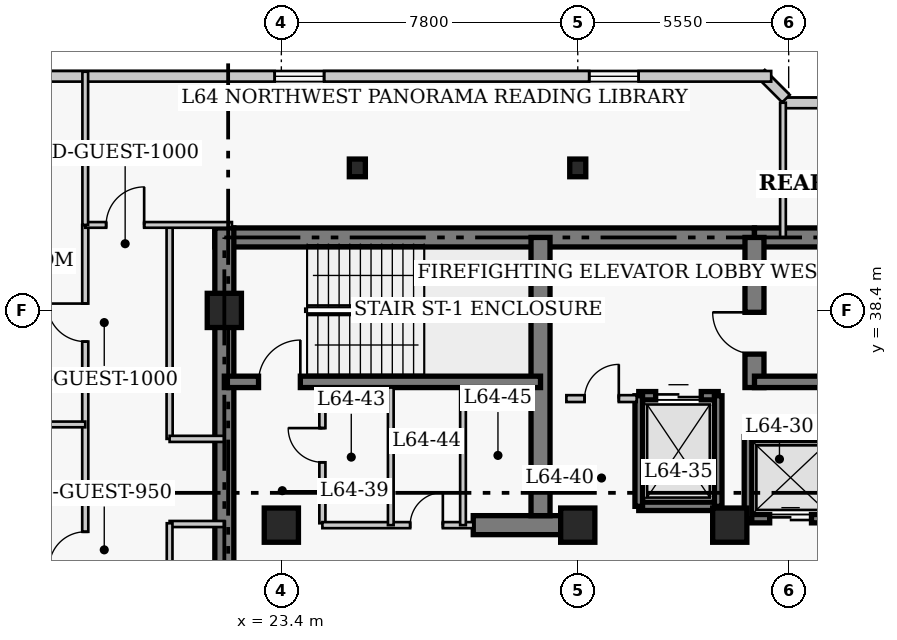
"""IFC4 building model, lengths in metres.
Left out: names, types, materials, properties, quantities, classifications, styles, units other than length and angle.
Written with IfcOpenShell. Run it as: python <this file> out.ifc"""

import sys

from ifc_helpers import new_model, si_unit, direction, frame, frame_2d, origin, origin_2d, place, context, subcontext, project, spatial, rectangle, i_section, extrude, element, fill, save


model = new_model("IFC4")
c1 = context("Model", 3, precision=1e-05, world=origin(), true_north=direction((0.0, 1.0)))
c2 = subcontext(c1, "Body", "Model", "MODEL_VIEW")
j1 = project(units=[si_unit("LENGTHUNIT", "METRE"), si_unit("PLANEANGLEUNIT", "RADIAN")], contexts=[c1])
p1 = place(None, origin())
s1 = spatial("IfcSite", under=j1, at=p1, CompositionType="ELEMENT")
p2 = place(p1, origin())
s2 = spatial("IfcBuilding", under=s1, at=p2, CompositionType="ELEMENT")
p3 = place(p2, frame((0.0, 0.0, 257.4)))
s3 = spatial("IfcBuildingStorey", under=s2, at=p3, CompositionType="ELEMENT", Elevation=257.4)
p4 = place(p3, frame((21.65, 40.32, 0.0), z_axis=(0.0, 0.0, 1.0), x_axis=(1.0, 0.0, 0.0)))
e1 = element("IfcWall", 1, at=p4, inside=s3, PredefinedType="SHEAR", context=c2, shape_type="SweptSolid", body=[
    extrude(rectangle(XDim=14.2, YDim=0.5, at=frame_2d((7.1, 0.0))), origin(), (0.0, 0.0, 1.0), 4.0),
])
p5 = place(p3, frame((35.85, 40.32, 0.0), z_axis=(0.0, 0.0, 1.0), x_axis=(1.0, 0.0, 0.0)))
e2 = element("IfcWall", 2, at=p5, inside=s3, PredefinedType="SHEAR", context=c2, shape_type="SweptSolid", body=[
    extrude(rectangle(XDim=12.6, YDim=0.5, at=frame_2d((6.3, 0.0))), origin(), (0.0, 0.0, 1.0), 4.0),
])
p6 = place(p3, frame((21.9, 27.05, 0.0), z_axis=(0.0, 0.0, 1.0), x_axis=(0.0, 1.0, 0.0)))
e3 = element("IfcWall", 3, at=p6, inside=s3, PredefinedType="SHEAR", context=c2, shape_type="SweptSolid", body=[
    extrude(rectangle(XDim=13.52, YDim=0.5, at=frame_2d((6.76, 0.0))), origin(), (0.0, 0.0, 1.0), 4.0),
])
p7 = place(p3, frame((28.45, 32.75, 0.0), z_axis=(0.0, 0.0, 1.0), x_axis=(1.0, 0.0, 0.0)))
e4 = element("IfcWall", 4, at=p7, inside=s3, PredefinedType="SHEAR", context=c2, shape_type="SweptSolid", body=[
    extrude(rectangle(XDim=2.4, YDim=0.5, at=frame_2d((1.2, 0.0))), origin(), (0.0, 0.0, 1.0), 4.0),
])
p8 = place(p3, frame((30.22, 33.0, 0.0), z_axis=(0.0, 0.0, 1.0), x_axis=(0.0, 1.0, 0.0)))
e5 = element("IfcWall", 5, at=p8, inside=s3, PredefinedType="SHEAR", context=c2, shape_type="SweptSolid", body=[
    extrude(rectangle(XDim=7.32, YDim=0.5, at=frame_2d((3.66, 0.0))), origin(), (0.0, 0.0, 1.0), 4.0),
])
p9 = place(p3, frame((35.85, 36.37, 0.0), z_axis=(0.0, 0.0, 1.0), x_axis=(0.0, 1.0, 0.0)))
e6 = element("IfcWall", 6, at=p9, inside=s3, PredefinedType="SHEAR", context=c2, shape_type="SweptSolid", body=[
    extrude(rectangle(XDim=3.95, YDim=0.5, at=frame_2d((1.975, 0.0))), origin(), (0.0, 0.0, 1.0), 4.0),
])
p10 = place(p9, frame((0.88, 0.0, 0.0)))
e7 = element("IfcOpeningElement", 7, at=p10, cuts=e6, PredefinedType="OPENING", context=c2, shape_type="SweptSolid", body=[
    extrude(rectangle(XDim=1.1, YDim=2.15, at=frame_2d((0.55, 1.075))), frame((0.0, 0.26, 0.0), z_axis=(0.0, -1.0, 0.0), x_axis=(1.0, 0.0, 0.0)), (0.0, 0.0, 1.0), 0.52),
])
p11 = place(p3, frame((21.9, 36.52, 0.0), z_axis=(0.0, 0.0, 1.0), x_axis=(1.0, 0.0, 0.0)))
e8 = element("IfcWall", 8, at=p11, inside=s3, PredefinedType="SHEAR", context=c2, shape_type="SweptSolid", body=[
    extrude(rectangle(XDim=8.32, YDim=0.3, at=frame_2d((4.16, 0.0))), origin(), (0.0, 0.0, 1.0), 4.0),
])
p12 = place(p11, frame((0.9, 0.0, 0.0)))
e9 = element("IfcOpeningElement", 9, at=p12, cuts=e8, PredefinedType="OPENING", context=c2, shape_type="SweptSolid", body=[
    extrude(rectangle(XDim=1.1, YDim=2.15, at=frame_2d((0.55, 1.075))), frame((0.0, 0.16, 0.0), z_axis=(0.0, -1.0, 0.0), x_axis=(1.0, 0.0, 0.0)), (0.0, 0.0, 1.0), 0.32),
])
p13 = place(p3, frame((35.85, 36.52, 0.0), z_axis=(0.0, 0.0, 1.0), x_axis=(1.0, 0.0, 0.0)))
e10 = element("IfcWall", 10, at=p13, inside=s3, PredefinedType="SHEAR", context=c2, shape_type="SweptSolid", body=[
    extrude(rectangle(XDim=8.33, YDim=0.3, at=frame_2d((4.165, 0.0))), origin(), (0.0, 0.0, 1.0), 4.0),
])
for number, where, z_axis, x_axis in (
    (11, (21.9, 38.4, 0.0), (0.0, 0.0, 1.0), (1.0, 0.0, 0.0)),
    (12, (23.4, 32.75, 0.0), (0.0, 0.0, 1.0), (1.0, 0.0, 0.0)),
    (13, (31.2, 32.75, 0.0), (0.0, 0.0, 1.0), (1.0, 0.0, 0.0)),
    (14, (35.2, 32.75, 0.0), (0.0, 0.0, 1.0), (1.0, 0.0, 0.0)),
):
    element("IfcColumn", number, at=place(p3, frame(where, z_axis=z_axis, x_axis=x_axis)), inside=s3, PredefinedType="COLUMN", context=c2, shape_type="SweptSolid", body=[
        extrude(rectangle(XDim=0.9, YDim=0.9, at=origin_2d()), origin(), (0.0, 0.0, 1.0), 4.0),
    ])
for number, where, z_axis, x_axis in (
    (15, (25.4, 42.15, 0.0), (0.0, 0.0, 1.0), (1.0, 0.0, 0.0)),
    (16, (31.2, 42.15, 0.0), (0.0, 0.0, 1.0), (1.0, 0.0, 0.0)),
):
    element("IfcColumn", number, at=place(p3, frame(where, z_axis=z_axis, x_axis=x_axis)), inside=s3, PredefinedType="COLUMN", context=c2, shape_type="SweptSolid", body=[
        extrude(i_section(OverallWidth=0.422, OverallDepth=0.465, WebThickness=0.045, FlangeThickness=0.073, FilletRadius=0.017, at=origin_2d()), origin(), (0.0, 0.0, 1.0), 4.0),
    ])
p14 = place(p3, frame((41.39, 43.86, 0.0), z_axis=(0.0, 0.0, 1.0), x_axis=(-1.0, 0.0, 0.0)))
e17 = element("IfcWall", 17, at=p14, inside=s3, PredefinedType="SOLIDWALL", context=c2, shape_type="SweptSolid", body=[
    extrude(rectangle(XDim=4.78, YDim=0.28, at=frame_2d((2.39, 0.0))), origin(), (0.0, 0.0, 1.0), 3.76),
])
p15 = place(p14, frame((1.74, 0.0, 0.85)))
e18 = element("IfcOpeningElement", 18, at=p15, cuts=e17, PredefinedType="OPENING", context=c2, shape_type="SweptSolid", body=[
    extrude(rectangle(XDim=1.3, YDim=1.7, at=frame_2d((0.65, 0.85))), frame((0.0, 0.15, 0.0), z_axis=(0.0, -1.0, 0.0), x_axis=(1.0, 0.0, 0.0)), (0.0, 0.0, 1.0), 0.3),
])
p16 = place(p3, frame((36.679, 43.973, 0.0), z_axis=(0.0, 0.0, 1.0), x_axis=(-0.706975312048, 0.707238225886, 0.0)))
e19 = element("IfcWall", 19, at=p16, inside=s3, PredefinedType="SOLIDWALL", context=c2, shape_type="SweptSolid", body=[
    extrude(rectangle(XDim=0.929, YDim=0.28, at=frame_2d((0.464, 0.0))), origin(), (0.0, 0.0, 1.0), 3.76),
])
p17 = place(p3, frame((36.29, 44.56, 0.0), z_axis=(0.0, 0.0, 1.0), x_axis=(-1.0, 0.0, 0.0)))
e20 = element("IfcWall", 20, at=p17, inside=s3, PredefinedType="SOLIDWALL", context=c2, shape_type="SweptSolid", body=[
    extrude(rectangle(XDim=24.83, YDim=0.28, at=frame_2d((12.415, 0.0))), origin(), (0.0, 0.0, 1.0), 3.76),
])
p18 = place(p17, frame((3.488, 0.0, 0.85)))
e21 = element("IfcOpeningElement", 21, at=p18, cuts=e20, PredefinedType="OPENING", context=c2, shape_type="SweptSolid", body=[
    extrude(rectangle(XDim=1.3, YDim=1.7, at=frame_2d((0.65, 0.85))), frame((0.0, 0.15, 0.0), z_axis=(0.0, -1.0, 0.0), x_axis=(1.0, 0.0, 0.0)), (0.0, 0.0, 1.0), 0.3),
])
p19 = place(p17, frame((11.765, 0.0, 0.85)))
e22 = element("IfcOpeningElement", 22, at=p19, cuts=e20, PredefinedType="OPENING", context=c2, shape_type="SweptSolid", body=[
    extrude(rectangle(XDim=1.3, YDim=1.7, at=frame_2d((0.65, 0.85))), frame((0.0, 0.15, 0.0), z_axis=(0.0, -1.0, 0.0), x_axis=(1.0, 0.0, 0.0)), (0.0, 0.0, 1.0), 0.3),
])
p20 = place(p17, frame((20.042, 0.0, 0.85)))
e23 = element("IfcOpeningElement", 23, at=p20, cuts=e20, PredefinedType="OPENING", context=c2, shape_type="SweptSolid", body=[
    extrude(rectangle(XDim=1.3, YDim=1.7, at=frame_2d((0.65, 0.85))), frame((0.0, 0.15, 0.0), z_axis=(0.0, -1.0, 0.0), x_axis=(1.0, 0.0, 0.0)), (0.0, 0.0, 1.0), 0.3),
])
p21 = place(p3, frame((35.68, 35.08, 0.0), z_axis=(0.0, 0.0, 1.0), x_axis=(1.0, 0.0, 0.0)))
e24 = element("IfcWall", 24, at=p21, inside=s3, PredefinedType="SHEAR", context=c2, shape_type="SweptSolid", body=[
    extrude(rectangle(XDim=2.32, YDim=0.22, at=frame_2d((1.16, 0.0))), origin(), (0.0, 0.0, 1.0), 4.0),
])
p22 = place(p3, frame((35.68, 32.92, 0.0), z_axis=(0.0, 0.0, 1.0), x_axis=(1.0, 0.0, 0.0)))
e25 = element("IfcWall", 25, at=p22, inside=s3, PredefinedType="SHEAR", context=c2, shape_type="SweptSolid", body=[
    extrude(rectangle(XDim=2.32, YDim=0.22, at=frame_2d((1.16, 0.0))), origin(), (0.0, 0.0, 1.0), 4.0),
])
p23 = place(p22, frame((0.57, 0.0, 0.0)))
e26 = element("IfcOpeningElement", 26, at=p23, cuts=e25, PredefinedType="OPENING", context=c2, shape_type="SweptSolid", body=[
    extrude(rectangle(XDim=1.1, YDim=2.15, at=frame_2d((0.55, 1.075))), frame((0.0, 0.12, 0.0), z_axis=(0.0, -1.0, 0.0), x_axis=(1.0, 0.0, 0.0)), (0.0, 0.0, 1.0), 0.24),
])
p24 = place(p3, frame((35.68, 32.92, 0.0), z_axis=(0.0, 0.0, 1.0), x_axis=(0.0, 1.0, 0.0)))
e27 = element("IfcWall", 27, at=p24, inside=s3, PredefinedType="SHEAR", context=c2, shape_type="SweptSolid", body=[
    extrude(rectangle(XDim=2.16, YDim=0.2, at=frame_2d((1.08, 0.0))), origin(), (0.0, 0.0, 1.0), 4.0),
])
p25 = place(p3, frame((32.805, 36.155, 0.0), z_axis=(0.0, 0.0, 1.0), x_axis=(1.0, 0.0, 0.0)))
e28 = element("IfcWall", 28, at=p25, inside=s3, PredefinedType="SHEAR", context=c2, shape_type="SweptSolid", body=[
    extrude(rectangle(XDim=2.09, YDim=0.22, at=frame_2d((1.045, 0.0))), origin(), (0.0, 0.0, 1.0), 4.0),
])
p26 = place(p25, frame((0.445, 0.0, 0.0)))
e29 = element("IfcOpeningElement", 29, at=p26, cuts=e28, PredefinedType="OPENING", context=c2, shape_type="SweptSolid", body=[
    extrude(rectangle(XDim=1.2, YDim=2.15, at=frame_2d((0.6, 1.075))), frame((0.0, 0.12, 0.0), z_axis=(0.0, -1.0, 0.0), x_axis=(1.0, 0.0, 0.0)), (0.0, 0.0, 1.0), 0.24),
])
p27 = place(p3, frame((32.805, 33.245, 0.0), z_axis=(0.0, 0.0, 1.0), x_axis=(1.0, 0.0, 0.0)))
e30 = element("IfcWall", 30, at=p27, inside=s3, PredefinedType="SHEAR", context=c2, shape_type="SweptSolid", body=[
    extrude(rectangle(XDim=2.09, YDim=0.22, at=frame_2d((1.045, 0.0))), origin(), (0.0, 0.0, 1.0), 4.0),
])
for number, where, z_axis, x_axis in (
    (31, (32.805, 33.245, 0.0), (0.0, 0.0, 1.0), (0.0, 1.0, 0.0)),
    (32, (34.895, 33.245, 0.0), (0.0, 0.0, 1.0), (0.0, 1.0, 0.0)),
):
    element("IfcWall", number, at=place(p3, frame(where, z_axis=z_axis, x_axis=x_axis)), inside=s3, PredefinedType="SHEAR", context=c2, shape_type="SweptSolid", body=[
        extrude(rectangle(XDim=2.91, YDim=0.2, at=frame_2d((1.455, 0.0))), origin(), (0.0, 0.0, 1.0), 4.0),
    ])
p28 = place(p3, frame((30.9, 36.08, 0.0), z_axis=(0.0, 0.0, 1.0), x_axis=(1.0, 0.0, 0.0)))
e33 = element("IfcWall", 33, at=p28, inside=s3, PredefinedType="PARTITIONING", context=c2, shape_type="SweptSolid", body=[
    extrude(rectangle(XDim=1.85, YDim=0.18, at=frame_2d((0.925, 0.0))), origin(), (0.0, 0.0, 1.0), 3.76),
])
p29 = place(p28, frame((0.48, 0.0, 0.0)))
e34 = element("IfcOpeningElement", 34, at=p29, cuts=e33, PredefinedType="OPENING", context=c2, shape_type="SweptSolid", body=[
    extrude(rectangle(XDim=0.9, YDim=2.15, at=frame_2d((0.45, 1.075))), frame((0.0, 0.1, 0.0), z_axis=(0.0, -1.0, 0.0), x_axis=(1.0, 0.0, 0.0)), (0.0, 0.0, 1.0), 0.2),
])
p30 = place(p3, frame((24.48, 32.8, 0.0), z_axis=(0.0, 0.0, 1.0), x_axis=(0.0, 1.0, 0.0)))
e35 = element("IfcWall", 35, at=p30, inside=s3, PredefinedType="PARTITIONING", context=c2, shape_type="SweptSolid", body=[
    extrude(rectangle(XDim=3.57, YDim=0.16, at=frame_2d((1.785, 0.0))), origin(), (0.0, 0.0, 1.0), 3.76),
])
p31 = place(p30, frame((1.604, 0.0, 0.0)))
e36 = element("IfcOpeningElement", 36, at=p31, cuts=e35, PredefinedType="OPENING", context=c2, shape_type="SweptSolid", body=[
    extrude(rectangle(XDim=0.9, YDim=2.1, at=frame_2d((0.45, 1.05))), frame((0.0, 0.09, 0.0), z_axis=(0.0, -1.0, 0.0), x_axis=(1.0, 0.0, 0.0)), (0.0, 0.0, 1.0), 0.18),
])
p32 = place(p3, frame((24.48, 32.75, 0.0), z_axis=(0.0, 0.0, 1.0), x_axis=(1.0, 0.0, 0.0)))
e37 = element("IfcWall", 37, at=p32, inside=s3, PredefinedType="PARTITIONING", context=c2, shape_type="SweptSolid", body=[
    extrude(rectangle(XDim=3.97, YDim=0.16, at=frame_2d((1.985, 0.0))), origin(), (0.0, 0.0, 1.0), 3.76),
])
p33 = place(p32, frame((2.31, 0.0, 0.0)))
e38 = element("IfcOpeningElement", 38, at=p33, cuts=e37, PredefinedType="OPENING", context=c2, shape_type="SweptSolid", body=[
    extrude(rectangle(XDim=0.86, YDim=2.05, at=frame_2d((0.43, 1.025))), frame((0.0, 0.09, 0.0), z_axis=(0.0, -1.0, 0.0), x_axis=(1.0, 0.0, 0.0)), (0.0, 0.0, 1.0), 0.18),
])
for number, where, z_axis, x_axis in (
    (39, (26.28, 32.75, 0.0), (0.0, 0.0, 1.0), (0.0, 1.0, 0.0)),
    (40, (28.18, 32.75, 0.0), (0.0, 0.0, 1.0), (0.0, 1.0, 0.0)),
):
    element("IfcWall", number, at=place(p3, frame(where, z_axis=z_axis, x_axis=x_axis)), inside=s3, PredefinedType="PARTITIONING", context=c2, shape_type="SweptSolid", body=[
        extrude(rectangle(XDim=3.62, YDim=0.15, at=frame_2d((1.81, 0.0))), origin(), (0.0, 0.0, 1.0), 3.76),
    ])
p34 = place(p3, frame((18.24, 8.55, 0.0), z_axis=(0.0, 0.0, 1.0), x_axis=(0.0, 1.0, 0.0)))
e41 = element("IfcWall", 41, at=p34, inside=s3, PredefinedType="PARTITIONING", context=c2, shape_type="SweptSolid", body=[
    extrude(rectangle(XDim=32.1, YDim=0.16, at=frame_2d((16.05, 0.0))), origin(), (0.0, 0.0, 1.0), 3.76),
])
p35 = place(p34, frame((5.25, 0.0, 0.0)))
e42 = element("IfcOpeningElement", 42, at=p35, cuts=e41, PredefinedType="OPENING", context=c2, shape_type="SweptSolid", body=[
    extrude(rectangle(XDim=0.95, YDim=2.1, at=frame_2d((0.475, 1.05))), frame((0.0, 0.09, 0.0), z_axis=(0.0, -1.0, 0.0), x_axis=(1.0, 0.0, 0.0)), (0.0, 0.0, 1.0), 0.18),
])
p36 = place(p34, frame((15.375, 0.0, 0.0)))
e43 = element("IfcOpeningElement", 43, at=p36, cuts=e41, PredefinedType="OPENING", context=c2, shape_type="SweptSolid", body=[
    extrude(rectangle(XDim=0.95, YDim=2.1, at=frame_2d((0.475, 1.05))), frame((0.0, 0.09, 0.0), z_axis=(0.0, -1.0, 0.0), x_axis=(1.0, 0.0, 0.0)), (0.0, 0.0, 1.0), 0.18),
])
p37 = place(p34, frame((23.075, 0.0, 0.0)))
e44 = element("IfcOpeningElement", 44, at=p37, cuts=e41, PredefinedType="OPENING", context=c2, shape_type="SweptSolid", body=[
    extrude(rectangle(XDim=0.95, YDim=2.1, at=frame_2d((0.475, 1.05))), frame((0.0, 0.09, 0.0), z_axis=(0.0, -1.0, 0.0), x_axis=(1.0, 0.0, 0.0)), (0.0, 0.0, 1.0), 0.18),
])
p38 = place(p34, frame((29.03, 0.0, 0.0)))
e45 = element("IfcOpeningElement", 45, at=p38, cuts=e41, PredefinedType="OPENING", context=c2, shape_type="SweptSolid", body=[
    extrude(rectangle(XDim=1.0, YDim=2.15, at=frame_2d((0.5, 1.075))), frame((0.0, 0.09, 0.0), z_axis=(0.0, -1.0, 0.0), x_axis=(1.0, 0.0, 0.0)), (0.0, 0.0, 1.0), 0.18),
])
p39 = place(p3, frame((20.46, 35.02, 0.0), z_axis=(0.0, 0.0, 1.0), x_axis=(0.0, 1.0, 0.0)))
e46 = element("IfcWall", 46, at=p39, inside=s3, PredefinedType="PARTITIONING", context=c2, shape_type="SweptSolid", body=[
    extrude(rectangle(XDim=5.63, YDim=0.16, at=frame_2d((2.815, 0.0))), origin(), (0.0, 0.0, 1.0), 3.76),
])
for number, where, z_axis, x_axis in (
    (47, (20.46, 35.02, 0.0), (0.0, 0.0, 1.0), (1.0, 0.0, 0.0)),
    (48, (20.46, 32.78, 0.0), (0.0, 0.0, 1.0), (1.0, 0.0, 0.0)),
):
    element("IfcWall", number, at=place(p3, frame(where, z_axis=z_axis, x_axis=x_axis)), inside=s3, PredefinedType="PARTITIONING", context=c2, shape_type="SweptSolid", body=[
        extrude(rectangle(XDim=1.44, YDim=0.16, at=frame_2d((0.72, 0.0))), origin(), (0.0, 0.0, 1.0), 3.76),
    ])
p40 = place(p3, frame((18.24, 40.65, 0.0), z_axis=(0.0, 0.0, 1.0), x_axis=(1.0, 0.0, 0.0)))
e49 = element("IfcWall", 49, at=p40, inside=s3, PredefinedType="PARTITIONING", context=c2, shape_type="SweptSolid", body=[
    extrude(rectangle(XDim=3.86, YDim=0.15, at=frame_2d((1.93, 0.0))), origin(), (0.0, 0.0, 1.0), 3.76),
])
p41 = place(p40, frame((0.55, 0.0, 0.0)))
e50 = element("IfcOpeningElement", 50, at=p41, cuts=e49, PredefinedType="OPENING", context=c2, shape_type="SweptSolid", body=[
    extrude(rectangle(XDim=1.0, YDim=2.15, at=frame_2d((0.5, 1.075))), frame((0.0, 0.085, 0.0), z_axis=(0.0, -1.0, 0.0), x_axis=(1.0, 0.0, 0.0)), (0.0, 0.0, 1.0), 0.17),
])
p42 = place(p3, frame((20.46, 26.41, 0.0), z_axis=(0.0, 0.0, 1.0), x_axis=(0.0, 1.0, 0.0)))
e51 = element("IfcWall", 51, at=p42, inside=s3, PredefinedType="PARTITIONING", context=c2, shape_type="SweptSolid", body=[
    extrude(rectangle(XDim=6.39, YDim=0.15, at=frame_2d((3.195, 0.0))), origin(), (0.0, 0.0, 1.0), 3.76),
])
p43 = place(p3, frame((18.24, 40.65, 0.0), z_axis=(0.0, 0.0, 1.0), x_axis=(0.0, 1.0, 0.0)))
e52 = element("IfcWall", 52, at=p43, inside=s3, PredefinedType="PARTITIONING", context=c2, shape_type="SweptSolid", body=[
    extrude(rectangle(XDim=4.03, YDim=0.15, at=frame_2d((2.015, 0.0))), origin(), (0.0, 0.0, 1.0), 3.76),
])
p44 = place(p3, frame((36.6, 40.32, 0.0), z_axis=(0.0, 0.0, 1.0), x_axis=(0.0, 1.0, 0.0)))
e53 = element("IfcWall", 53, at=p44, inside=s3, PredefinedType="PARTITIONING", context=c2, shape_type="SweptSolid", body=[
    extrude(rectangle(XDim=3.545, YDim=0.15, at=frame_2d((1.772, 0.0))), origin(), (0.0, 0.0, 1.0), 3.76),
])
p45 = place(p3, frame((14.45, 35.4, 0.0), z_axis=(0.0, 0.0, 1.0), x_axis=(1.0, 0.0, 0.0)))
e54 = element("IfcWall", 54, at=p45, inside=s3, PredefinedType="PARTITIONING", context=c2, shape_type="SweptSolid", body=[
    extrude(rectangle(XDim=3.79, YDim=0.15, at=frame_2d((1.895, 0.0))), origin(), (0.0, 0.0, 1.0), 3.76),
])
p46 = place(p18, origin())
e55 = element("IfcWindow", 55, at=p46, inside=s3, PartitioningType="SINGLE_PANEL", PredefinedType="WINDOW", context=c2, shape_type="SweptSolid", body=[
    extrude(rectangle(XDim=1.3, YDim=1.7, at=frame_2d((0.65, 0.85))), frame((0.0, 0.03, 0.0), z_axis=(0.0, -1.0, 0.0), x_axis=(1.0, 0.0, 0.0)), (0.0, 0.0, 1.0), 0.06),
])
fill(e21, e55)
p47 = place(p19, origin())
e56 = element("IfcWindow", 56, at=p47, inside=s3, PartitioningType="SINGLE_PANEL", PredefinedType="WINDOW", context=c2, shape_type="SweptSolid", body=[
    extrude(rectangle(XDim=1.3, YDim=1.7, at=frame_2d((0.65, 0.85))), frame((0.0, 0.03, 0.0), z_axis=(0.0, -1.0, 0.0), x_axis=(1.0, 0.0, 0.0)), (0.0, 0.0, 1.0), 0.06),
])
fill(e22, e56)
p48 = place(p23, origin())
e57 = element("IfcDoor", 57, at=p48, inside=s3, OperationType="DOUBLE_DOOR_SLIDING", PredefinedType="DOOR", context=c2, shape_type="SweptSolid", body=[
    extrude(rectangle(XDim=1.1, YDim=2.15, at=frame_2d((0.55, 1.075))), frame((0.0, 0.025, 0.0), z_axis=(0.0, -1.0, 0.0), x_axis=(1.0, 0.0, 0.0)), (0.0, 0.0, 1.0), 0.05),
])
fill(e26, e57)
p49 = place(p26, origin())
e58 = element("IfcDoor", 58, at=p49, inside=s3, OperationType="DOUBLE_DOOR_SLIDING", PredefinedType="DOOR", context=c2, shape_type="SweptSolid", body=[
    extrude(rectangle(XDim=1.2, YDim=2.15, at=frame_2d((0.6, 1.075))), frame((0.0, 0.025, 0.0), z_axis=(0.0, -1.0, 0.0), x_axis=(1.0, 0.0, 0.0)), (0.0, 0.0, 1.0), 0.05),
])
fill(e29, e58)
p50 = place(p29, origin())
e59 = element("IfcDoor", 59, at=p50, inside=s3, OperationType="SINGLE_SWING_RIGHT", PredefinedType="DOOR", context=c2, shape_type="SweptSolid", body=[
    extrude(rectangle(XDim=0.9, YDim=2.15, at=frame_2d((0.45, 1.075))), frame((0.0, 0.025, 0.0), z_axis=(0.0, -1.0, 0.0), x_axis=(1.0, 0.0, 0.0)), (0.0, 0.0, 1.0), 0.05),
])
fill(e34, e59)
p51 = place(p31, origin())
e60 = element("IfcDoor", 60, at=p51, inside=s3, OperationType="SINGLE_SWING_RIGHT", PredefinedType="DOOR", context=c2, shape_type="SweptSolid", body=[
    extrude(rectangle(XDim=0.9, YDim=2.1, at=frame_2d((0.45, 1.05))), frame((0.0, 0.025, 0.0), z_axis=(0.0, -1.0, 0.0), x_axis=(1.0, 0.0, 0.0)), (0.0, 0.0, 1.0), 0.05),
])
fill(e36, e60)
p52 = place(p33, origin())
e61 = element("IfcDoor", 61, at=p52, inside=s3, OperationType="SINGLE_SWING_RIGHT", PredefinedType="DOOR", context=c2, shape_type="SweptSolid", body=[
    extrude(rectangle(XDim=0.86, YDim=2.05, at=frame_2d((0.43, 1.025))), frame((0.0, 0.025, 0.0), z_axis=(0.0, -1.0, 0.0), x_axis=(1.0, 0.0, 0.0)), (0.0, 0.0, 1.0), 0.05),
])
fill(e38, e61)
p53 = place(p41, origin())
e62 = element("IfcDoor", 62, at=p53, inside=s3, OperationType="SINGLE_SWING_RIGHT", PredefinedType="DOOR", context=c2, shape_type="SweptSolid", body=[
    extrude(rectangle(XDim=1.0, YDim=2.15, at=frame_2d((0.5, 1.075))), frame((0.0, 0.025, 0.0), z_axis=(0.0, -1.0, 0.0), x_axis=(1.0, 0.0, 0.0)), (0.0, 0.0, 1.0), 0.05),
])
fill(e50, e62)
p54 = place(p37, origin())
e63 = element("IfcDoor", 63, at=p54, inside=s3, OperationType="SINGLE_SWING_LEFT", PredefinedType="DOOR", context=c2, shape_type="SweptSolid", body=[
    extrude(rectangle(XDim=0.95, YDim=2.1, at=frame_2d((0.475, 1.05))), frame((0.0, 0.025, 0.0), z_axis=(0.0, -1.0, 0.0), x_axis=(1.0, 0.0, 0.0)), (0.0, 0.0, 1.0), 0.05),
])
fill(e44, e63)
p55 = place(p38, origin())
e64 = element("IfcDoor", 64, at=p55, inside=s3, OperationType="SINGLE_SWING_RIGHT", PredefinedType="DOOR", context=c2, shape_type="SweptSolid", body=[
    extrude(rectangle(XDim=1.0, YDim=2.15, at=frame_2d((0.5, 1.075))), frame((0.0, 0.025, 0.0), z_axis=(0.0, -1.0, 0.0), x_axis=(1.0, 0.0, 0.0)), (0.0, 0.0, 1.0), 0.05),
])
fill(e45, e64)
p56 = place(p12, origin())
e65 = element("IfcDoor", 65, at=p56, inside=s3, OperationType="SINGLE_SWING_RIGHT", PredefinedType="DOOR", context=c2, shape_type="SweptSolid", body=[
    extrude(rectangle(XDim=1.1, YDim=2.15, at=frame_2d((0.55, 1.075))), frame((0.0, 0.025, 0.0), z_axis=(0.0, -1.0, 0.0), x_axis=(1.0, 0.0, 0.0)), (0.0, 0.0, 1.0), 0.05),
])
fill(e9, e65)
p57 = place(p10, origin())
e66 = element("IfcDoor", 66, at=p57, inside=s3, OperationType="SINGLE_SWING_RIGHT", PredefinedType="DOOR", context=c2, shape_type="SweptSolid", body=[
    extrude(rectangle(XDim=1.1, YDim=2.15, at=frame_2d((0.55, 1.075))), frame((0.0, 0.025, 0.0), z_axis=(0.0, -1.0, 0.0), x_axis=(1.0, 0.0, 0.0)), (0.0, 0.0, 1.0), 0.05),
])
fill(e7, e66)
save(model, sys.argv[1])
